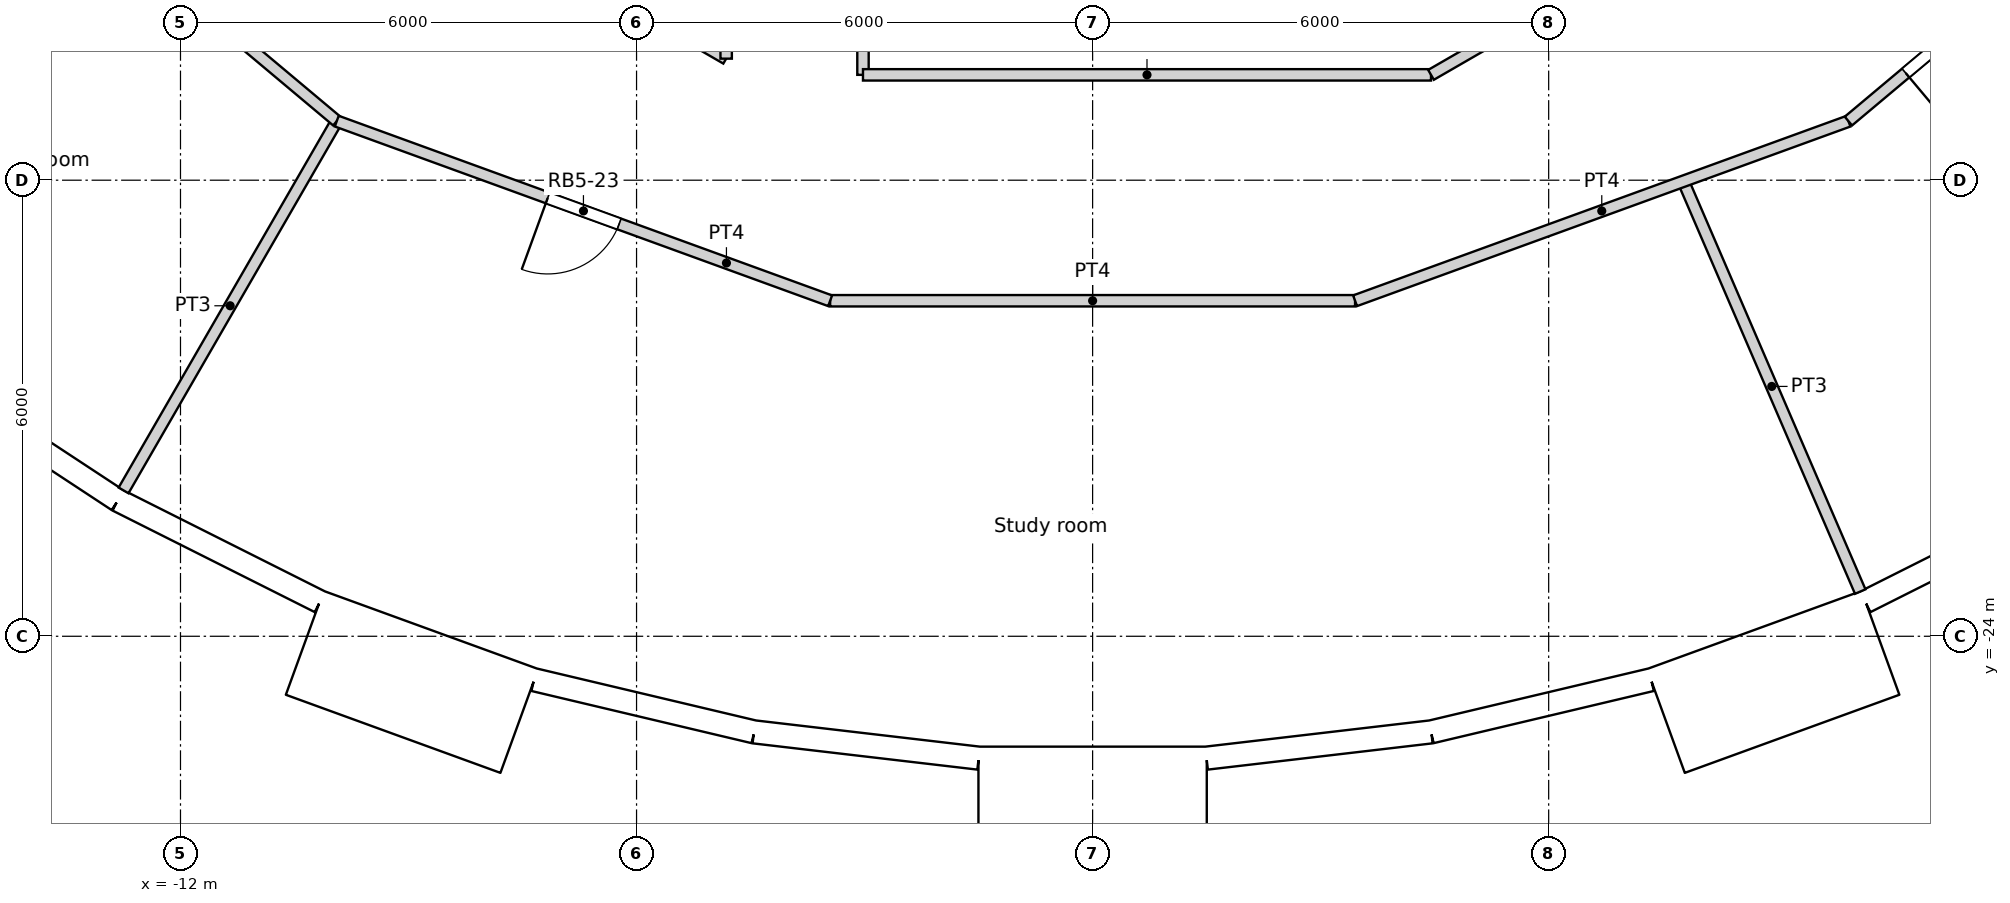
"""IFC4 building model, lengths in metres.
Left out: names, types, materials, properties, quantities, classifications, styles, units other than length and angle.
Written with IfcOpenShell. Run it as: python <this file> out.ifc"""

import sys

from ifc_helpers import new_model, si_unit, direction, frame, frame_2d, origin, origin_2d, place, context, subcontext, project, spatial, rectangle, circle, extrude, element, fill, save


model = new_model("IFC4")
c1 = context("Model", 3, precision=1e-05, world=origin(), true_north=direction((0.0, 1.0)))
c2 = subcontext(c1, "Body", "Model", "MODEL_VIEW")
j1 = project(units=[si_unit("LENGTHUNIT", "METRE"), si_unit("PLANEANGLEUNIT", "RADIAN")], contexts=[c1])
p1 = place(None, origin())
s1 = spatial("IfcSite", under=j1, at=p1, CompositionType="ELEMENT")
p2 = place(p1, origin())
s2 = spatial("IfcBuilding", under=s1, at=p2, CompositionType="ELEMENT")
p3 = place(p2, frame((0.0, 0.0, 169.2)))
s3 = spatial("IfcBuildingStorey", under=s2, at=p3, CompositionType="ELEMENT", Elevation=169.2)
for number, where, z_axis, x_axis in (
    (1, (-12.274, -21.259, 0.0), (0.0, 0.0, 1.0), (1.0, 0.0, 0.0)),
    (2, (-7.04, -23.516, 0.0), (0.0, 0.0, 1.0), (1.0, 0.0, 0.0)),
    (3, (-1.427, -24.506, 0.0), (0.0, 0.0, 1.0), (1.0, 0.0, 0.0)),
    (4, (4.263, -24.175, 0.0), (0.0, 0.0, 1.0), (1.0, 0.0, 0.0)),
    (5, (9.723, -22.54, 0.0), (0.0, 0.0, 1.0), (1.0, 0.0, 0.0)),
):
    element("IfcColumn", number, at=place(p3, frame(where, z_axis=z_axis, x_axis=x_axis)), inside=s3, PredefinedType="COLUMN", context=c2, shape_type="SweptSolid", body=[
        extrude(circle(Radius=0.6, at=origin_2d()), origin(), (0.0, 0.0, 1.0), 3.6),
    ])
for number, where, z_axis, x_axis in (
    (6, (-9.411, -16.301, 0.0), (0.0, 0.0, 1.0), (1.0, 0.0, 0.0)),
    (7, (-4.188, -18.35, 0.0), (0.0, 0.0, 1.0), (1.0, 0.0, 0.0)),
    (8, (1.406, -18.77, 0.0), (0.0, 0.0, 1.0), (1.0, 0.0, 0.0)),
    (9, (6.876, -17.521, 0.0), (0.0, 0.0, 1.0), (1.0, 0.0, 0.0)),
):
    element("IfcColumn", number, at=place(p3, frame(where, z_axis=z_axis, x_axis=x_axis)), inside=s3, PredefinedType="COLUMN", context=c2, shape_type="SweptSolid", body=[
        extrude(circle(Radius=0.65, at=origin_2d()), origin(), (0.0, 0.0, 1.0), 3.6),
    ])
p4 = place(p3, frame((-15.308, -20.578, 0.0), z_axis=(0.0, 0.0, 1.0), x_axis=(0.835470659512, -0.549535055382, 0.0)))
e10 = element("IfcWall", 10, at=p4, inside=s3, PredefinedType="SOLIDWALL", context=c2, shape_type="SweptSolid", body=[
    extrude(rectangle(XDim=2.973, YDim=0.3, at=frame_2d((1.487, 0.0))), origin(), (0.0, 0.0, 1.0), 3.3),
])
p5 = place(p4, frame((1.486, 0.0, 1.55)))
e11 = element("IfcOpeningElement", 11, at=p5, cuts=e10, PredefinedType="OPENING", context=c2, shape_type="SweptSolid", body=[
    extrude(circle(Radius=0.9, at=origin_2d()), frame((0.0, 0.16, 0.0), z_axis=(0.0, -1.0, 0.0), x_axis=(1.0, 0.0, 0.0)), (0.0, 0.0, 1.0), 0.32),
])
p6 = place(p3, frame((-12.824, -22.211, 0.0), z_axis=(0.0, 0.0, 1.0), x_axis=(0.893637442555, -0.448789618045, 0.0)))
e12 = element("IfcWall", 12, at=p6, inside=s3, PredefinedType="SOLIDWALL", context=c2, shape_type="SweptSolid", body=[
    extrude(rectangle(XDim=2.973, YDim=0.3, at=frame_2d((1.486, 0.0))), origin(), (0.0, 0.0, 1.0), 3.3),
])
p7 = place(p6, frame((1.486, 0.0, 1.55)))
e13 = element("IfcOpeningElement", 13, at=p7, cuts=e12, PredefinedType="OPENING", context=c2, shape_type="SweptSolid", body=[
    extrude(circle(Radius=0.9, at=origin_2d()), frame((0.0, 0.16, 0.0), z_axis=(0.0, -1.0, 0.0), x_axis=(1.0, 0.0, 0.0)), (0.0, 0.0, 1.0), 0.32),
])
p8 = place(p3, frame((-10.363, -24.087, -0.3), z_axis=(0.0, 0.0, 1.0), x_axis=(0.939686455819, -0.342037080957, 0.0)))
e14 = element("IfcWall", 14, at=p8, inside=s3, PredefinedType="ELEMENTEDWALL", context=c2, shape_type="SweptSolid", body=[
    extrude(rectangle(XDim=3.0, YDim=1.45, at=frame_2d((1.5, 0.0))), origin(), (0.0, 0.0, 1.0), 3.6),
])
p9 = place(p8, frame((1.5, 0.0, 1.85)))
e15 = element("IfcOpeningElement", 15, at=p9, cuts=e14, PredefinedType="OPENING", context=c2, shape_type="SweptSolid", body=[
    extrude(circle(Radius=0.9, at=origin_2d()), frame((0.0, 0.735, 0.0), z_axis=(0.0, -1.0, 0.0), x_axis=(1.0, 0.0, 0.0)), (0.0, 0.0, 1.0), 1.47),
])
p10 = place(p3, frame((-7.346, -24.572, 0.0), z_axis=(0.0, 0.0, 1.0), x_axis=(0.973049746156, -0.230595298102, 0.0)))
e16 = element("IfcWall", 16, at=p10, inside=s3, PredefinedType="SOLIDWALL", context=c2, shape_type="SweptSolid", body=[
    extrude(rectangle(XDim=2.973, YDim=0.3, at=frame_2d((1.486, 0.0))), origin(), (0.0, 0.0, 1.0), 3.3),
])
p11 = place(p10, frame((1.486, 0.0, 1.55)))
e17 = element("IfcOpeningElement", 17, at=p11, cuts=e16, PredefinedType="OPENING", context=c2, shape_type="SweptSolid", body=[
    extrude(circle(Radius=0.9, at=origin_2d()), frame((0.0, 0.16, 0.0), z_axis=(0.0, -1.0, 0.0), x_axis=(1.0, 0.0, 0.0)), (0.0, 0.0, 1.0), 0.32),
])
p12 = place(p3, frame((-4.454, -25.258, 0.0), z_axis=(0.0, 0.0, 1.0), x_axis=(0.993235542767, -0.116116995244, 0.0)))
e18 = element("IfcWall", 18, at=p12, inside=s3, PredefinedType="SOLIDWALL", context=c2, shape_type="SweptSolid", body=[
    extrude(rectangle(XDim=2.973, YDim=0.3, at=frame_2d((1.486, 0.0))), origin(), (0.0, 0.0, 1.0), 3.3),
])
p13 = place(p12, frame((1.486, 0.0, 1.55)))
e19 = element("IfcOpeningElement", 19, at=p13, cuts=e18, PredefinedType="OPENING", context=c2, shape_type="SweptSolid", body=[
    extrude(circle(Radius=0.9, at=origin_2d()), frame((0.0, 0.16, 0.0), z_axis=(0.0, -1.0, 0.0), x_axis=(1.0, 0.0, 0.0)), (0.0, 0.0, 1.0), 0.32),
])
p14 = place(p3, frame((-1.5, -26.179, -0.3), z_axis=(0.0, 0.0, 1.0), x_axis=(1.0, 0.0, 0.0)))
e20 = element("IfcWall", 20, at=p14, inside=s3, PredefinedType="ELEMENTEDWALL", context=c2, shape_type="SweptSolid", body=[
    extrude(rectangle(XDim=3.0, YDim=1.45, at=frame_2d((1.5, 0.0))), origin(), (0.0, 0.0, 1.0), 3.6),
])
p15 = place(p14, frame((1.5, 0.0, 1.85)))
e21 = element("IfcOpeningElement", 21, at=p15, cuts=e20, PredefinedType="OPENING", context=c2, shape_type="SweptSolid", body=[
    extrude(circle(Radius=0.9, at=origin_2d()), frame((0.0, 0.735, 0.0), z_axis=(0.0, -1.0, 0.0), x_axis=(1.0, 0.0, 0.0)), (0.0, 0.0, 1.0), 1.47),
])
p16 = place(p3, frame((1.501, -25.603, 0.0), z_axis=(0.0, 0.0, 1.0), x_axis=(0.993235542767, 0.116116995244, 0.0)))
e22 = element("IfcWall", 22, at=p16, inside=s3, PredefinedType="SOLIDWALL", context=c2, shape_type="SweptSolid", body=[
    extrude(rectangle(XDim=2.973, YDim=0.3, at=frame_2d((1.486, 0.0))), origin(), (0.0, 0.0, 1.0), 3.3),
])
p17 = place(p16, frame((1.486, 0.0, 1.55)))
e23 = element("IfcOpeningElement", 23, at=p17, cuts=e22, PredefinedType="OPENING", context=c2, shape_type="SweptSolid", body=[
    extrude(circle(Radius=0.9, at=origin_2d()), frame((0.0, 0.16, 0.0), z_axis=(0.0, -1.0, 0.0), x_axis=(1.0, 0.0, 0.0)), (0.0, 0.0, 1.0), 0.32),
])
p18 = place(p3, frame((4.454, -25.258, 0.0), z_axis=(0.0, 0.0, 1.0), x_axis=(0.973049746156, 0.230595298102, 0.0)))
e24 = element("IfcWall", 24, at=p18, inside=s3, PredefinedType="SOLIDWALL", context=c2, shape_type="SweptSolid", body=[
    extrude(rectangle(XDim=2.973, YDim=0.3, at=frame_2d((1.486, 0.0))), origin(), (0.0, 0.0, 1.0), 3.3),
])
p19 = place(p18, frame((1.486, 0.0, 1.55)))
e25 = element("IfcOpeningElement", 25, at=p19, cuts=e24, PredefinedType="OPENING", context=c2, shape_type="SweptSolid", body=[
    extrude(circle(Radius=0.9, at=origin_2d()), frame((0.0, 0.16, 0.0), z_axis=(0.0, -1.0, 0.0), x_axis=(1.0, 0.0, 0.0)), (0.0, 0.0, 1.0), 0.32),
])
p20 = place(p3, frame((7.544, -25.113, -0.3), z_axis=(0.0, 0.0, 1.0), x_axis=(0.939686455819, 0.342037080957, 0.0)))
e26 = element("IfcWall", 26, at=p20, inside=s3, PredefinedType="ELEMENTEDWALL", context=c2, shape_type="SweptSolid", body=[
    extrude(rectangle(XDim=3.0, YDim=1.45, at=frame_2d((1.5, 0.0))), origin(), (0.0, 0.0, 1.0), 3.6),
])
p21 = place(p20, frame((1.5, 0.0, 1.85)))
e27 = element("IfcOpeningElement", 27, at=p21, cuts=e26, PredefinedType="OPENING", context=c2, shape_type="SweptSolid", body=[
    extrude(circle(Radius=0.9, at=origin_2d()), frame((0.0, 0.735, 0.0), z_axis=(0.0, -1.0, 0.0), x_axis=(1.0, 0.0, 0.0)), (0.0, 0.0, 1.0), 1.47),
])
p22 = place(p3, frame((10.167, -23.546, 0.0), z_axis=(0.0, 0.0, 1.0), x_axis=(0.893637442555, 0.448789618045, 0.0)))
e28 = element("IfcWall", 28, at=p22, inside=s3, PredefinedType="SOLIDWALL", context=c2, shape_type="SweptSolid", body=[
    extrude(rectangle(XDim=2.973, YDim=0.3, at=frame_2d((1.486, 0.0))), origin(), (0.0, 0.0, 1.0), 3.3),
])
p23 = place(p22, frame((1.486, 0.0, 1.55)))
e29 = element("IfcOpeningElement", 29, at=p23, cuts=e28, PredefinedType="OPENING", context=c2, shape_type="SweptSolid", body=[
    extrude(circle(Radius=0.9, at=origin_2d()), frame((0.0, 0.16, 0.0), z_axis=(0.0, -1.0, 0.0), x_axis=(1.0, 0.0, 0.0)), (0.0, 0.0, 1.0), 0.32),
])
p24 = place(p3, frame((9.943, -17.222, 0.0), z_axis=(0.0, 0.0, 1.0), x_axis=(0.766192104565, 0.642611592567, 0.0)))
e30 = element("IfcWall", 30, at=p24, inside=s3, PredefinedType="PARTITIONING", context=c2, shape_type="SweptSolid", body=[
    extrude(rectangle(XDim=6.906, YDim=0.15, at=frame_2d((3.453, 0.0))), origin(), (0.0, 0.0, 1.0), 3.3),
])
p25 = place(p24, frame((0.984, 0.0, 0.0)))
e31 = element("IfcOpeningElement", 31, at=p25, cuts=e30, PredefinedType="OPENING", context=c2, shape_type="SweptSolid", body=[
    extrude(rectangle(XDim=1.0, YDim=2.04, at=frame_2d((0.5, 1.02))), frame((0.0, 0.075, 0.0), z_axis=(0.0, -1.0, 0.0), x_axis=(1.0, 0.0, 0.0)), (0.0, 0.0, 1.0), 0.15),
])
p26 = place(p3, frame((-15.235, -12.784, 0.0), z_axis=(0.0, 0.0, 1.0), x_axis=(0.766192104565, -0.642611592567, 0.0)))
e32 = element("IfcWall", 32, at=p26, inside=s3, PredefinedType="PARTITIONING", context=c2, shape_type="SweptSolid", body=[
    extrude(rectangle(XDim=6.906, YDim=0.15, at=frame_2d((3.453, 0.0))), origin(), (0.0, 0.0, 1.0), 3.3),
])
p27 = place(p3, frame((-12.162, -12.162, 0.0), z_axis=(0.0, 0.0, 1.0), x_axis=(0.866004766557, -0.500035743023, 0.0)))
e33 = element("IfcWall", 33, at=p27, inside=s3, PredefinedType="PARTITIONING", context=c2, shape_type="SweptSolid", body=[
    extrude(rectangle(XDim=8.477, YDim=0.15, at=frame_2d((4.239, 0.0))), origin(), (0.0, 0.0, 1.0), 3.3),
])
p28 = place(p27, frame((3.763, 0.0, 0.0)))
e34 = element("IfcOpeningElement", 34, at=p28, cuts=e33, PredefinedType="OPENING", context=c2, shape_type="SweptSolid", body=[
    extrude(rectangle(XDim=0.95, YDim=2.1, at=frame_2d((0.475, 1.05))), frame((0.0, 0.075, 0.0), z_axis=(0.0, -1.0, 0.0), x_axis=(1.0, 0.0, 0.0)), (0.0, 0.0, 1.0), 0.15),
])
p29 = place(p3, frame((-4.821, -16.401, 0.0), z_axis=(0.0, 0.0, 1.0), x_axis=(0.0, 1.0, 0.0)))
e35 = element("IfcWall", 35, at=p29, inside=s3, PredefinedType="PARTITIONING", context=c2, shape_type="SweptSolid", body=[
    extrude(rectangle(XDim=6.101, YDim=0.15, at=frame_2d((3.05, 0.0))), origin(), (0.0, 0.0, 1.0), 3.3),
])
p30 = place(p3, frame((-3.021, -16.614, 0.0), z_axis=(0.0, 0.0, 1.0), x_axis=(0.0, 1.0, 0.0)))
e36 = element("IfcWall", 36, at=p30, inside=s3, PredefinedType="PARTITIONING", context=c2, shape_type="SweptSolid", body=[
    extrude(rectangle(XDim=6.314, YDim=0.15, at=frame_2d((3.157, 0.0))), origin(), (0.0, 0.0, 1.0), 3.3),
])
p31 = place(p3, frame((-3.021, -16.614, 0.0), z_axis=(0.0, 0.0, 1.0), x_axis=(1.0, 0.0, 0.0)))
e37 = element("IfcWall", 37, at=p31, inside=s3, PredefinedType="PARTITIONING", context=c2, shape_type="SweptSolid", body=[
    extrude(rectangle(XDim=7.473, YDim=0.15, at=frame_2d((3.736, 0.0))), origin(), (0.0, 0.0, 1.0), 3.3),
])
p32 = place(p3, frame((4.452, -16.614, 0.0), z_axis=(0.0, 0.0, 1.0), x_axis=(0.866005203721, 0.500034985904, 0.0)))
e38 = element("IfcWall", 38, at=p32, inside=s3, PredefinedType="PARTITIONING", context=c2, shape_type="SweptSolid", body=[
    extrude(rectangle(XDim=8.903, YDim=0.15, at=frame_2d((4.452, 0.0))), origin(), (0.0, 0.0, 1.0), 3.3),
])
p33 = place(p3, frame((3.453, -19.586, 0.0), z_axis=(0.0, 0.0, 1.0), x_axis=(0.939695353595, 0.342012634901, 0.0)))
e39 = element("IfcWall", 39, at=p33, inside=s3, PredefinedType="PARTITIONING", context=c2, shape_type="SweptSolid", body=[
    extrude(rectangle(XDim=6.908, YDim=0.15, at=frame_2d((3.454, 0.0))), origin(), (0.0, 0.0, 1.0), 3.3),
])
p34 = place(p3, frame((-3.453, -19.586, 0.0), z_axis=(0.0, 0.0, 1.0), x_axis=(1.0, 0.0, 0.0)))
e40 = element("IfcWall", 40, at=p34, inside=s3, PredefinedType="PARTITIONING", context=c2, shape_type="SweptSolid", body=[
    extrude(rectangle(XDim=6.906, YDim=0.15, at=frame_2d((3.453, 0.0))), origin(), (0.0, 0.0, 1.0), 3.3),
])
p35 = place(p3, frame((-9.944, -17.223, 0.0), z_axis=(0.0, 0.0, 1.0), x_axis=(0.939672634566, -0.342075050021, 0.0)))
e41 = element("IfcWall", 41, at=p35, inside=s3, PredefinedType="PARTITIONING", context=c2, shape_type="SweptSolid", body=[
    extrude(rectangle(XDim=6.908, YDim=0.15, at=frame_2d((3.454, 0.0))), origin(), (0.0, 0.0, 1.0), 3.3),
])
p36 = place(p35, frame((2.954, 0.0, 0.0)))
e42 = element("IfcOpeningElement", 42, at=p36, cuts=e41, PredefinedType="OPENING", context=c2, shape_type="SweptSolid", body=[
    extrude(rectangle(XDim=1.0, YDim=2.04, at=frame_2d((0.5, 1.02))), frame((0.0, 0.075, 0.0), z_axis=(0.0, -1.0, 0.0), x_axis=(1.0, 0.0, 0.0)), (0.0, 0.0, 1.0), 0.15),
])
p37 = place(p3, frame((-12.749, -22.081, 0.0), z_axis=(0.0, 0.0, 1.0), x_axis=(0.500010020406, 0.866019618423, 0.0)))
e43 = element("IfcWall", 43, at=p37, inside=s3, PredefinedType="PARTITIONING", context=c2, shape_type="SweptSolid", body=[
    extrude(rectangle(XDim=5.61, YDim=0.15, at=frame_2d((2.805, 0.0))), origin(), (0.0, 0.0, 1.0), 3.3),
])
p38 = place(p3, frame((7.771, -18.014, 0.0), z_axis=(0.0, 0.0, 1.0), x_axis=(0.39601833725, -0.918242602236, 0.0)))
e44 = element("IfcWall", 44, at=p38, inside=s3, PredefinedType="PARTITIONING", context=c2, shape_type="SweptSolid", body=[
    extrude(rectangle(XDim=5.879, YDim=0.15, at=frame_2d((2.939, 0.0))), origin(), (0.0, 0.0, 1.0), 3.3),
])
p39 = place(p5, origin())
e45 = element("IfcWindow", 45, at=p39, inside=s3, PartitioningType="SINGLE_PANEL", PredefinedType="WINDOW", context=c2, shape_type="SweptSolid", body=[
    extrude(circle(Radius=0.9, at=origin_2d()), frame((0.0, 0.12, 0.0), z_axis=(0.0, -1.0, 0.0), x_axis=(1.0, 0.0, 0.0)), (0.0, 0.0, 1.0), 0.1),
])
fill(e11, e45)
p40 = place(p7, origin())
e46 = element("IfcWindow", 46, at=p40, inside=s3, PartitioningType="SINGLE_PANEL", PredefinedType="WINDOW", context=c2, shape_type="SweptSolid", body=[
    extrude(circle(Radius=0.9, at=origin_2d()), frame((0.0, 0.12, 0.0), z_axis=(0.0, -1.0, 0.0), x_axis=(1.0, 0.0, 0.0)), (0.0, 0.0, 1.0), 0.1),
])
fill(e13, e46)
p41 = place(p9, origin())
e47 = element("IfcWindow", 47, at=p41, inside=s3, PartitioningType="SINGLE_PANEL", PredefinedType="WINDOW", context=c2, shape_type="SweptSolid", body=[
    extrude(circle(Radius=0.9, at=origin_2d()), frame((0.0, 0.695, 0.0), z_axis=(0.0, -1.0, 0.0), x_axis=(1.0, 0.0, 0.0)), (0.0, 0.0, 1.0), 0.1),
])
fill(e15, e47)
p42 = place(p11, origin())
e48 = element("IfcWindow", 48, at=p42, inside=s3, PartitioningType="SINGLE_PANEL", PredefinedType="WINDOW", context=c2, shape_type="SweptSolid", body=[
    extrude(circle(Radius=0.9, at=origin_2d()), frame((0.0, 0.12, 0.0), z_axis=(0.0, -1.0, 0.0), x_axis=(1.0, 0.0, 0.0)), (0.0, 0.0, 1.0), 0.1),
])
fill(e17, e48)
p43 = place(p13, origin())
e49 = element("IfcWindow", 49, at=p43, inside=s3, PartitioningType="SINGLE_PANEL", PredefinedType="WINDOW", context=c2, shape_type="SweptSolid", body=[
    extrude(circle(Radius=0.9, at=origin_2d()), frame((0.0, 0.12, 0.0), z_axis=(0.0, -1.0, 0.0), x_axis=(1.0, 0.0, 0.0)), (0.0, 0.0, 1.0), 0.1),
])
fill(e19, e49)
p44 = place(p15, origin())
e50 = element("IfcWindow", 50, at=p44, inside=s3, PartitioningType="SINGLE_PANEL", PredefinedType="WINDOW", context=c2, shape_type="SweptSolid", body=[
    extrude(circle(Radius=0.9, at=origin_2d()), frame((0.0, 0.695, 0.0), z_axis=(0.0, -1.0, 0.0), x_axis=(1.0, 0.0, 0.0)), (0.0, 0.0, 1.0), 0.1),
])
fill(e21, e50)
p45 = place(p17, origin())
e51 = element("IfcWindow", 51, at=p45, inside=s3, PartitioningType="SINGLE_PANEL", PredefinedType="WINDOW", context=c2, shape_type="SweptSolid", body=[
    extrude(circle(Radius=0.9, at=origin_2d()), frame((0.0, 0.12, 0.0), z_axis=(0.0, -1.0, 0.0), x_axis=(1.0, 0.0, 0.0)), (0.0, 0.0, 1.0), 0.1),
])
fill(e23, e51)
p46 = place(p19, origin())
e52 = element("IfcWindow", 52, at=p46, inside=s3, PartitioningType="SINGLE_PANEL", PredefinedType="WINDOW", context=c2, shape_type="SweptSolid", body=[
    extrude(circle(Radius=0.9, at=origin_2d()), frame((0.0, 0.12, 0.0), z_axis=(0.0, -1.0, 0.0), x_axis=(1.0, 0.0, 0.0)), (0.0, 0.0, 1.0), 0.1),
])
fill(e25, e52)
p47 = place(p21, origin())
e53 = element("IfcWindow", 53, at=p47, inside=s3, PartitioningType="SINGLE_PANEL", PredefinedType="WINDOW", context=c2, shape_type="SweptSolid", body=[
    extrude(circle(Radius=0.9, at=origin_2d()), frame((0.0, 0.695, 0.0), z_axis=(0.0, -1.0, 0.0), x_axis=(1.0, 0.0, 0.0)), (0.0, 0.0, 1.0), 0.1),
])
fill(e27, e53)
p48 = place(p23, origin())
e54 = element("IfcWindow", 54, at=p48, inside=s3, PartitioningType="SINGLE_PANEL", PredefinedType="WINDOW", context=c2, shape_type="SweptSolid", body=[
    extrude(circle(Radius=0.9, at=origin_2d()), frame((0.0, 0.12, 0.0), z_axis=(0.0, -1.0, 0.0), x_axis=(1.0, 0.0, 0.0)), (0.0, 0.0, 1.0), 0.1),
])
fill(e29, e54)
p49 = place(p36, origin())
e55 = element("IfcDoor", 55, at=p49, inside=s3, OperationType="SINGLE_SWING_RIGHT", PredefinedType="DOOR", context=c2, shape_type="SweptSolid", body=[
    extrude(rectangle(XDim=1.0, YDim=2.04, at=frame_2d((0.5, 1.02))), frame((0.0, 0.025, 0.0), z_axis=(0.0, -1.0, 0.0), x_axis=(1.0, 0.0, 0.0)), (0.0, 0.0, 1.0), 0.05),
])
fill(e42, e55)
p50 = place(p25, origin())
e56 = element("IfcDoor", 56, at=p50, inside=s3, OperationType="SINGLE_SWING_RIGHT", PredefinedType="DOOR", context=c2, shape_type="SweptSolid", body=[
    extrude(rectangle(XDim=1.0, YDim=2.04, at=frame_2d((0.5, 1.02))), frame((0.0, 0.025, 0.0), z_axis=(0.0, -1.0, 0.0), x_axis=(1.0, 0.0, 0.0)), (0.0, 0.0, 1.0), 0.05),
])
fill(e31, e56)
save(model, sys.argv[1])
